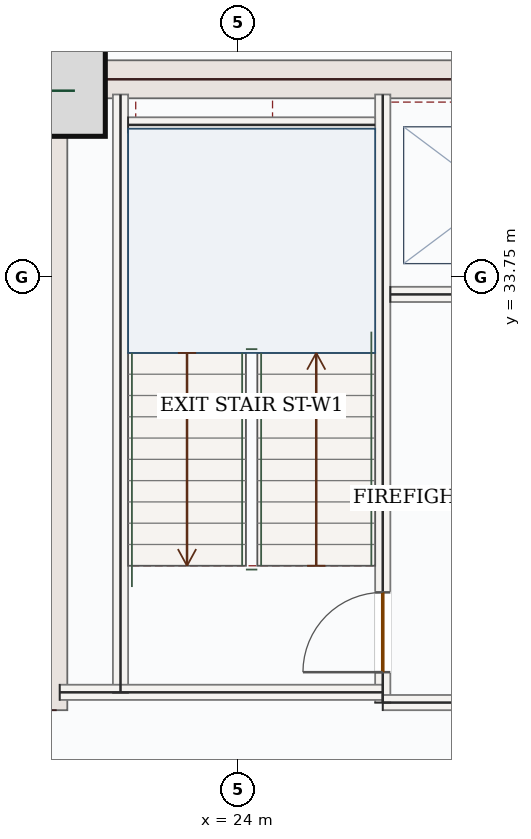
"""IFC4 building model, lengths in metres.
Left out: names, types, materials, properties, quantities, classifications, styles, units other than length and angle.
Written with IfcOpenShell. Run it as: python <this file> out.ifc"""

import sys

from ifc_helpers import new_model, si_unit, direction, frame, frame_2d, origin, origin_2d, place, context, subcontext, project, spatial, rectangle, extrude, source, transform, mapped, element, fill, save


model = new_model("IFC4")
c1 = context("Model", 3, precision=1e-05, world=origin(), true_north=direction((0.0, 1.0)))
c2 = subcontext(c1, "Body", "Model", "MODEL_VIEW")
j1 = project(units=[si_unit("LENGTHUNIT", "METRE"), si_unit("PLANEANGLEUNIT", "RADIAN")], contexts=[c1])
p1 = place(None, origin())
s1 = spatial("IfcSite", under=j1, at=p1, CompositionType="ELEMENT")
p2 = place(p1, origin())
s2 = spatial("IfcBuilding", under=s1, at=p2, CompositionType="ELEMENT")
p3 = place(p2, frame((0.0, 0.0, 198.0)))
s3 = spatial("IfcBuildingStorey", under=s2, at=p3, CompositionType="ELEMENT", Elevation=198.0)
m1 = source(origin(), c2, "Body", "SweptSolid", [
    extrude(rectangle(XDim=8.55, YDim=0.5, at=frame_2d((4.275, 0.0))), origin(), (0.0, 0.0, 1.0), 3.62),
])
p4 = place(p3, frame((21.5, 28.05, 0.0), z_axis=(0.0, 0.0, 1.0), x_axis=(0.0, 1.0, 0.0)))
e1 = element("IfcWall", 1, at=p4, inside=s3, PredefinedType="SHEAR", context=c2, shape_type="MappedRepresentation", body=[
    mapped(m1, transform((0.0, 0.0, 0.0), x_axis=(1.0, 0.0, 0.0), y_axis=(0.0, 1.0, 0.0), z_axis=(0.0, 0.0, 1.0), scale=1.0)),
])
m2 = source(origin(), c2, "Body", "SweptSolid", [
    extrude(rectangle(XDim=7.0, YDim=0.5, at=frame_2d((3.5, 0.0))), origin(), (0.0, 0.0, 1.0), 3.62),
])
p5 = place(p3, frame((21.75, 36.35, 0.0), z_axis=(0.0, 0.0, 1.0), x_axis=(1.0, 0.0, 0.0)))
e2 = element("IfcWall", 2, at=p5, inside=s3, PredefinedType="SHEAR", context=c2, shape_type="MappedRepresentation", body=[
    mapped(m2, transform((0.0, 0.0, 0.0), x_axis=(1.0, 0.0, 0.0), y_axis=(0.0, 1.0, 0.0), z_axis=(0.0, 0.0, 1.0), scale=1.0)),
])
m3 = source(origin(), c2, "Body", "SweptSolid", [
    extrude(rectangle(XDim=1.2, YDim=1.2, at=origin_2d()), origin(), (0.0, 0.0, 1.0), 3.9),
])
p6 = place(p3, frame((21.65, 36.2, 0.0), z_axis=(0.0, 0.0, 1.0), x_axis=(1.0, 0.0, 0.0)))
e3 = element("IfcColumn", 3, at=p6, inside=s3, PredefinedType="COLUMN", context=c2, shape_type="MappedRepresentation", body=[
    mapped(m3, transform((0.0, 0.0, 0.0), x_axis=(1.0, 0.0, 0.0), y_axis=(0.0, 1.0, 0.0), z_axis=(0.0, 0.0, 1.0), scale=1.0)),
])
m4 = source(origin(), c2, "Body", "SweptSolid", [
    extrude(rectangle(XDim=5.258, YDim=0.28, at=frame_2d((2.629, 0.0))), origin(), (0.0, 0.0, 1.0), 3.62),
])
p7 = place(p3, frame((18.94, 35.542, 0.0), z_axis=(0.0, 0.0, 1.0), x_axis=(0.707106781187, 0.707106781187, 0.0)))
e4 = element("IfcWall", 4, at=p7, inside=s3, PredefinedType="SOLIDWALL", context=c2, shape_type="MappedRepresentation", body=[
    mapped(m4, transform((0.0, 0.0, 0.0), x_axis=(1.0, 0.0, 0.0), y_axis=(0.0, 1.0, 0.0), z_axis=(0.0, 0.0, 1.0), scale=1.0)),
])
m5 = source(origin(), c2, "Body", "SweptSolid", [
    extrude(rectangle(XDim=7.87, YDim=0.2, at=frame_2d((3.935, 0.0))), origin(), (0.0, 0.0, 1.0), 3.62),
])
p8 = place(p3, frame((22.45, 28.28, 0.0), z_axis=(0.0, 0.0, 1.0), x_axis=(0.0, 1.0, 0.0)))
e5 = element("IfcWall", 5, at=p8, inside=s3, PredefinedType="SOLIDWALL", context=c2, shape_type="MappedRepresentation", body=[
    mapped(m5, transform((0.0, 0.0, 0.0), x_axis=(1.0, 0.0, 0.0), y_axis=(0.0, 1.0, 0.0), z_axis=(0.0, 0.0, 1.0), scale=1.0)),
])
p9 = place(p3, frame((25.9, 28.15, 0.0), z_axis=(0.0, 0.0, 1.0), x_axis=(0.0, 1.0, 0.0)))
e6 = element("IfcWall", 6, at=p9, inside=s3, PredefinedType="SOLIDWALL", context=c2, shape_type="SweptSolid", body=[
    extrude(rectangle(XDim=8.0, YDim=0.2, at=frame_2d((4.0, 0.0))), origin(), (0.0, 0.0, 1.0), 3.62),
])
p10 = place(p9, frame((0.4, 0.0, 0.0)))
e7 = element("IfcOpeningElement", 7, at=p10, cuts=e6, PredefinedType="OPENING", context=c2, shape_type="SweptSolid", body=[
    extrude(rectangle(XDim=1.05, YDim=2.15, at=frame_2d((0.525, 1.075))), frame((0.0, 0.11, 0.0), z_axis=(0.0, -1.0, 0.0), x_axis=(1.0, 0.0, 0.0)), (0.0, 0.0, 1.0), 0.22),
])
m6 = source(origin(), c2, "Body", "SweptSolid", [
    extrude(rectangle(XDim=4.25, YDim=0.2, at=frame_2d((2.125, 0.0))), origin(), (0.0, 0.0, 1.0), 3.62),
])
p11 = place(p3, frame((21.65, 28.285, 0.0), z_axis=(0.0, 0.0, 1.0), x_axis=(1.0, 0.0, 0.0)))
e8 = element("IfcWall", 8, at=p11, inside=s3, PredefinedType="SOLIDWALL", context=c2, shape_type="MappedRepresentation", body=[
    mapped(m6, transform((0.0, 0.0, 0.0), x_axis=(1.0, 0.0, 0.0), y_axis=(0.0, 1.0, 0.0), z_axis=(0.0, 0.0, 1.0), scale=1.0)),
])
m7 = source(origin(), c2, "Body", "SweptSolid", [
    extrude(rectangle(XDim=3.0, YDim=0.2, at=frame_2d((1.5, 0.0))), origin(), (0.0, 0.0, 1.0), 3.62),
])
p12 = place(p3, frame((25.9, 28.15, 0.0), z_axis=(0.0, 0.0, 1.0), x_axis=(1.0, 0.0, 0.0)))
e9 = element("IfcWall", 9, at=p12, inside=s3, PredefinedType="SOLIDWALL", context=c2, shape_type="MappedRepresentation", body=[
    mapped(m7, transform((0.0, 0.0, 0.0), x_axis=(1.0, 0.0, 0.0), y_axis=(0.0, 1.0, 0.0), z_axis=(0.0, 0.0, 1.0), scale=1.0)),
])
m8 = source(origin(), c2, "Body", "SweptSolid", [
    extrude(rectangle(XDim=3.25, YDim=0.2, at=frame_2d((1.625, 0.0))), origin(), (0.0, 0.0, 1.0), 3.62),
])
p13 = place(p3, frame((22.55, 35.75, 0.0), z_axis=(0.0, 0.0, 1.0), x_axis=(1.0, 0.0, 0.0)))
e10 = element("IfcWall", 10, at=p13, inside=s3, PredefinedType="SOLIDWALL", context=c2, shape_type="MappedRepresentation", body=[
    mapped(m8, transform((0.0, 0.0, 0.0), x_axis=(1.0, 0.0, 0.0), y_axis=(0.0, 1.0, 0.0), z_axis=(0.0, 0.0, 1.0), scale=1.0)),
])
p14 = place(p3, frame((26.0, 33.52, 0.0), z_axis=(0.0, 0.0, 1.0), x_axis=(1.0, 0.0, 0.0)))
e11 = element("IfcWall", 11, at=p14, inside=s3, PredefinedType="SOLIDWALL", context=c2, shape_type="SweptSolid", body=[
    extrude(rectangle(XDim=2.75, YDim=0.2, at=frame_2d((1.375, 0.0))), origin(), (0.0, 0.0, 1.0), 3.62),
])
p15 = place(p14, frame((0.82, 0.0, 0.0)))
e12 = element("IfcOpeningElement", 12, at=p15, cuts=e11, PredefinedType="OPENING", context=c2, shape_type="SweptSolid", body=[
    extrude(rectangle(XDim=1.1, YDim=2.15, at=frame_2d((0.55, 1.075))), frame((0.0, 0.11, 0.0), z_axis=(0.0, -1.0, 0.0), x_axis=(1.0, 0.0, 0.0)), (0.0, 0.0, 1.0), 0.22),
])
m9 = source(origin(), c2, "Body", "SweptSolid", [
    extrude(rectangle(XDim=1.05, YDim=2.15, at=frame_2d((0.525, 1.075))), frame((0.0, 0.025, 0.0), z_axis=(0.0, -1.0, 0.0), x_axis=(1.0, 0.0, 0.0)), (0.0, 0.0, 1.0), 0.05),
])
p16 = place(p10, origin())
e13 = element("IfcDoor", 13, at=p16, inside=s3, OperationType="SINGLE_SWING_LEFT", PredefinedType="DOOR", context=c2, shape_type="MappedRepresentation", body=[
    mapped(m9, transform((0.0, 0.0, 0.0), x_axis=(1.0, 0.0, 0.0), y_axis=(0.0, 1.0, 0.0), z_axis=(0.0, 0.0, 1.0), scale=1.0)),
])
fill(e7, e13)
save(model, sys.argv[1])
